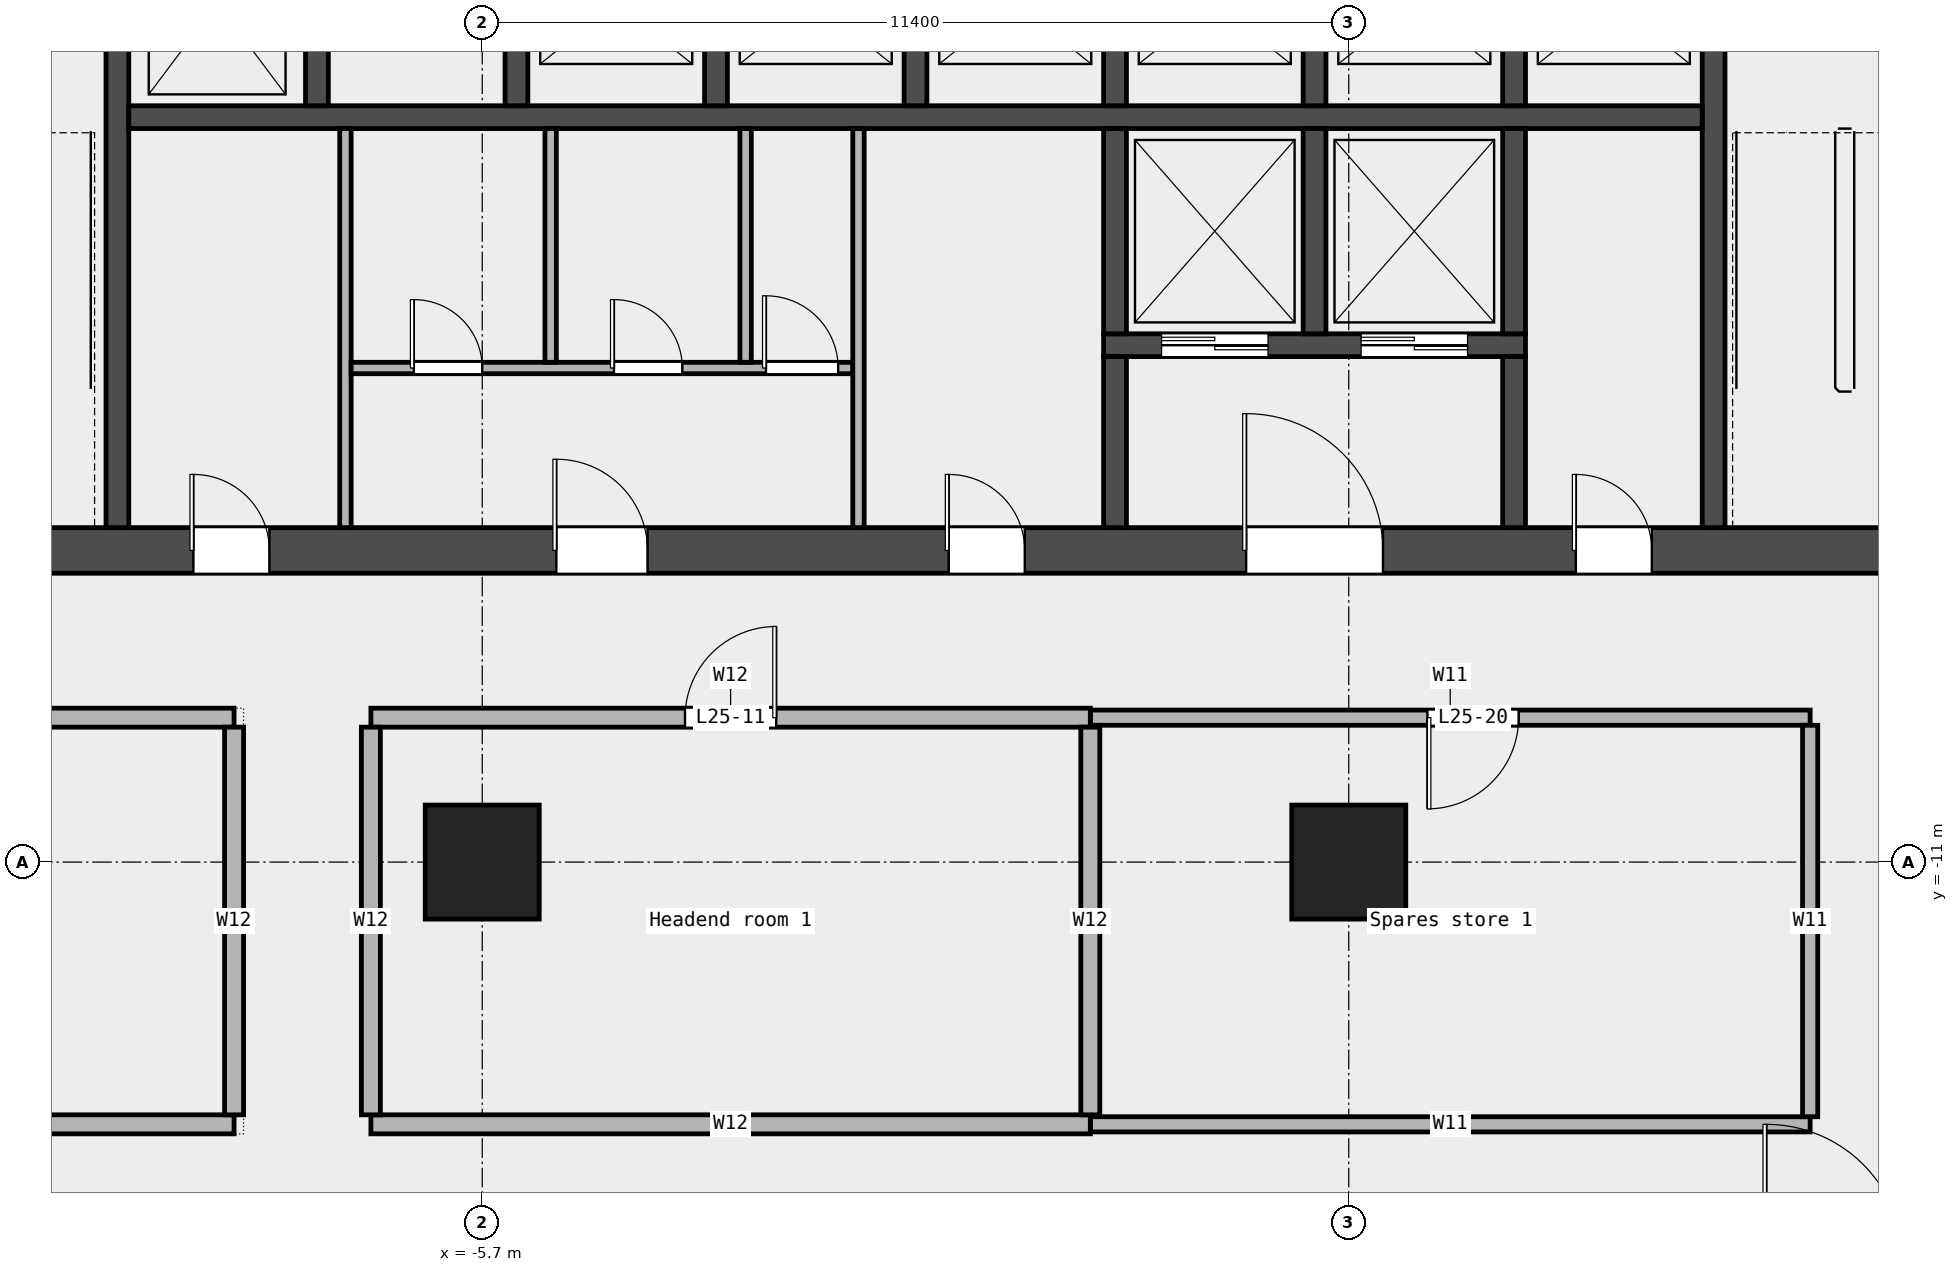
"""IFC4 building model, lengths in metres.
Left out: names, types, materials, properties, quantities, classifications, styles, units other than length and angle.
Written with IfcOpenShell. Run it as: python <this file> out.ifc"""

import sys

from ifc_helpers import new_model, si_unit, direction, frame, frame_2d, origin, origin_2d, place, context, subcontext, project, spatial, rectangle, extrude, element, fill, save


model = new_model("IFC4")
c1 = context("Model", 3, precision=1e-05, world=origin(), true_north=direction((0.0, 1.0)))
c2 = subcontext(c1, "Body", "Model", "MODEL_VIEW")
j1 = project(units=[si_unit("LENGTHUNIT", "METRE"), si_unit("PLANEANGLEUNIT", "RADIAN")], contexts=[c1])
p1 = place(None, origin())
s1 = spatial("IfcSite", under=j1, at=p1, CompositionType="ELEMENT")
p2 = place(p1, origin())
s2 = spatial("IfcBuilding", under=s1, at=p2, CompositionType="ELEMENT")
p3 = place(p2, frame((0.0, 0.0, 126.1)))
s3 = spatial("IfcBuildingStorey", under=s2, at=p3, CompositionType="ELEMENT", Elevation=126.1)
for number, where, z_axis, x_axis in (
    (1, (-5.7, -11.0, 0.0), (0.0, 0.0, 1.0), (1.0, 0.0, 0.0)),
    (2, (5.7, -11.0, 0.0), (0.0, 0.0, 1.0), (1.0, 0.0, 0.0)),
):
    element("IfcColumn", number, at=place(p3, frame(where, z_axis=z_axis, x_axis=x_axis)), inside=s3, PredefinedType="COLUMN", context=c2, shape_type="SweptSolid", body=[
        extrude(rectangle(XDim=1.5, YDim=1.5, at=origin_2d()), origin(), (0.0, 0.0, 1.0), 4.05),
    ])
p4 = place(p3, frame((2.3, -14.45, 0.0), z_axis=(0.0, 0.0, 1.0), x_axis=(1.0, 0.0, 0.0)))
e3 = element("IfcWall", 3, at=p4, inside=s3, PredefinedType="PARTITIONING", context=c2, shape_type="SweptSolid", body=[
    extrude(rectangle(XDim=9.47, YDim=0.2, at=frame_2d((4.735, 0.0))), origin(), (0.0, 0.0, 1.0), 4.05),
])
p5 = place(p3, frame((-15.9, -14.45, 0.0), z_axis=(0.0, 0.0, 1.0), x_axis=(1.0, 0.0, 0.0)))
e4 = element("IfcWall", 4, at=p5, inside=s3, PredefinedType="PARTITIONING", context=c2, shape_type="SweptSolid", body=[
    extrude(rectangle(XDim=6.935, YDim=0.25, at=frame_2d((3.467, 0.0))), origin(), (0.0, 0.0, 1.0), 4.05),
])
p6 = place(p3, frame((-7.165, -14.45, 0.0), z_axis=(0.0, 0.0, 1.0), x_axis=(1.0, 0.0, 0.0)))
e5 = element("IfcWall", 5, at=p6, inside=s3, PredefinedType="PARTITIONING", context=c2, shape_type="SweptSolid", body=[
    extrude(rectangle(XDim=9.465, YDim=0.25, at=frame_2d((4.732, 0.0))), origin(), (0.0, 0.0, 1.0), 4.05),
])
p7 = place(p3, frame((2.3, -9.1, 0.0), z_axis=(0.0, 0.0, 1.0), x_axis=(1.0, 0.0, 0.0)))
e6 = element("IfcWall", 6, at=p7, inside=s3, PredefinedType="PARTITIONING", context=c2, shape_type="SweptSolid", body=[
    extrude(rectangle(XDim=9.47, YDim=0.2, at=frame_2d((4.735, 0.0))), origin(), (0.0, 0.0, 1.0), 4.05),
])
p8 = place(p7, frame((4.435, 0.0, 0.0)))
e7 = element("IfcOpeningElement", 7, at=p8, cuts=e6, PredefinedType="OPENING", context=c2, shape_type="SweptSolid", body=[
    extrude(rectangle(XDim=1.2, YDim=2.1, at=frame_2d((0.6, 1.05))), frame((0.0, 0.112, 0.0), z_axis=(0.0, -1.0, 0.0), x_axis=(1.0, 0.0, 0.0)), (0.0, 0.0, 1.0), 0.224),
])
p9 = place(p3, frame((-15.9, -9.1, 0.0), z_axis=(0.0, 0.0, 1.0), x_axis=(1.0, 0.0, 0.0)))
e8 = element("IfcWall", 8, at=p9, inside=s3, PredefinedType="PARTITIONING", context=c2, shape_type="SweptSolid", body=[
    extrude(rectangle(XDim=6.935, YDim=0.25, at=frame_2d((3.467, 0.0))), origin(), (0.0, 0.0, 1.0), 4.05),
])
p10 = place(p9, frame((3.018, 0.0, 0.0)))
e9 = element("IfcOpeningElement", 9, at=p10, cuts=e8, PredefinedType="OPENING", context=c2, shape_type="SweptSolid", body=[
    extrude(rectangle(XDim=0.9, YDim=2.1, at=frame_2d((0.45, 1.05))), frame((0.0, 0.137, 0.0), z_axis=(0.0, -1.0, 0.0), x_axis=(1.0, 0.0, 0.0)), (0.0, 0.0, 1.0), 0.274),
])
p11 = place(p3, frame((-7.165, -9.1, 0.0), z_axis=(0.0, 0.0, 1.0), x_axis=(1.0, 0.0, 0.0)))
e10 = element("IfcWall", 10, at=p11, inside=s3, PredefinedType="PARTITIONING", context=c2, shape_type="SweptSolid", body=[
    extrude(rectangle(XDim=9.465, YDim=0.25, at=frame_2d((4.732, 0.0))), origin(), (0.0, 0.0, 1.0), 4.05),
])
p12 = place(p11, frame((4.133, 0.0, 0.0)))
e11 = element("IfcOpeningElement", 11, at=p12, cuts=e10, PredefinedType="OPENING", context=c2, shape_type="SweptSolid", body=[
    extrude(rectangle(XDim=1.2, YDim=2.1, at=frame_2d((0.6, 1.05))), frame((0.0, 0.137, 0.0), z_axis=(0.0, -1.0, 0.0), x_axis=(1.0, 0.0, 0.0)), (0.0, 0.0, 1.0), 0.274),
])
for number, where, z_axis, x_axis in (
    (12, (-8.965, -14.325, 0.0), (0.0, 0.0, 1.0), (0.0, 1.0, 0.0)),
    (13, (-7.165, -14.325, 0.0), (0.0, 0.0, 1.0), (0.0, 1.0, 0.0)),
    (14, (2.3, -14.325, 0.0), (0.0, 0.0, 1.0), (0.0, 1.0, 0.0)),
):
    element("IfcWall", number, at=place(p3, frame(where, z_axis=z_axis, x_axis=x_axis)), inside=s3, PredefinedType="PARTITIONING", context=c2, shape_type="SweptSolid", body=[
        extrude(rectangle(XDim=5.1, YDim=0.25, at=frame_2d((2.55, 0.0))), origin(), (0.0, 0.0, 1.0), 4.05),
    ])
p13 = place(p3, frame((11.77, -14.35, 0.0), z_axis=(0.0, 0.0, 1.0), x_axis=(0.0, 1.0, 0.0)))
e15 = element("IfcWall", 15, at=p13, inside=s3, PredefinedType="PARTITIONING", context=c2, shape_type="SweptSolid", body=[
    extrude(rectangle(XDim=5.15, YDim=0.2, at=frame_2d((2.575, 0.0))), origin(), (0.0, 0.0, 1.0), 4.05),
])
p14 = place(p3, frame((-14.4, -6.9, 0.0), z_axis=(0.0, 0.0, 1.0), x_axis=(1.0, 0.0, 0.0)))
e16 = element("IfcWall", 16, at=p14, inside=s3, PredefinedType="SHEAR", context=c2, shape_type="SweptSolid", body=[
    extrude(rectangle(XDim=28.8, YDim=0.6, at=frame_2d((14.4, 0.0))), origin(), (0.0, 0.0, 1.0), 4.2),
])
p15 = place(p14, frame((4.9, 0.0, 0.0)))
e17 = element("IfcOpeningElement", 17, at=p15, cuts=e16, PredefinedType="OPENING", context=c2, shape_type="SweptSolid", body=[
    extrude(rectangle(XDim=1.0, YDim=2.1, at=frame_2d((0.5, 1.05))), frame((0.0, 0.312, 0.0), z_axis=(0.0, -1.0, 0.0), x_axis=(1.0, 0.0, 0.0)), (0.0, 0.0, 1.0), 0.624),
])
p16 = place(p14, frame((9.675, 0.0, 0.0)))
e18 = element("IfcOpeningElement", 18, at=p16, cuts=e16, PredefinedType="OPENING", context=c2, shape_type="SweptSolid", body=[
    extrude(rectangle(XDim=1.2, YDim=2.1, at=frame_2d((0.6, 1.05))), frame((0.0, 0.312, 0.0), z_axis=(0.0, -1.0, 0.0), x_axis=(1.0, 0.0, 0.0)), (0.0, 0.0, 1.0), 0.624),
])
p17 = place(p14, frame((14.837, 0.0, 0.0)))
e19 = element("IfcOpeningElement", 19, at=p17, cuts=e16, PredefinedType="OPENING", context=c2, shape_type="SweptSolid", body=[
    extrude(rectangle(XDim=1.0, YDim=2.1, at=frame_2d((0.5, 1.05))), frame((0.0, 0.312, 0.0), z_axis=(0.0, -1.0, 0.0), x_axis=(1.0, 0.0, 0.0)), (0.0, 0.0, 1.0), 0.624),
])
p18 = place(p14, frame((18.75, 0.0, 0.0)))
e20 = element("IfcOpeningElement", 20, at=p18, cuts=e16, PredefinedType="OPENING", context=c2, shape_type="SweptSolid", body=[
    extrude(rectangle(XDim=1.8, YDim=2.1, at=frame_2d((0.9, 1.05))), frame((0.0, 0.312, 0.0), z_axis=(0.0, -1.0, 0.0), x_axis=(1.0, 0.0, 0.0)), (0.0, 0.0, 1.0), 0.624),
])
p19 = place(p14, frame((23.087, 0.0, 0.0)))
e21 = element("IfcOpeningElement", 21, at=p19, cuts=e16, PredefinedType="OPENING", context=c2, shape_type="SweptSolid", body=[
    extrude(rectangle(XDim=1.0, YDim=2.1, at=frame_2d((0.5, 1.05))), frame((0.0, 0.312, 0.0), z_axis=(0.0, -1.0, 0.0), x_axis=(1.0, 0.0, 0.0)), (0.0, 0.0, 1.0), 0.624),
])
for number, where, z_axis, x_axis in (
    (22, (-10.5, -6.6, 0.0), (0.0, 0.0, 1.0), (0.0, 1.0, 0.0)),
    (23, (10.5, -6.6, 0.0), (0.0, 0.0, 1.0), (0.0, 1.0, 0.0)),
):
    element("IfcWall", number, at=place(p3, frame(where, z_axis=z_axis, x_axis=x_axis)), inside=s3, PredefinedType="SHEAR", context=c2, shape_type="SweptSolid", body=[
        extrude(rectangle(XDim=8.55, YDim=0.3, at=frame_2d((4.275, 0.0))), origin(), (0.0, 0.0, 1.0), 4.2),
    ])
p20 = place(p3, frame((-10.35, -1.2, 0.0), z_axis=(0.0, 0.0, 1.0), x_axis=(1.0, 0.0, 0.0)))
e24 = element("IfcWall", 24, at=p20, inside=s3, PredefinedType="SOLIDWALL", context=c2, shape_type="SweptSolid", body=[
    extrude(rectangle(XDim=20.7, YDim=0.3, at=frame_2d((10.35, 0.0))), origin(), (0.0, 0.0, 1.0), 4.2),
])
for number, where, z_axis, x_axis in (
    (25, (-7.875, -1.05, 0.0), (0.0, 0.0, 1.0), (0.0, 1.0, 0.0)),
    (26, (-5.25, -1.05, 0.0), (0.0, 0.0, 1.0), (0.0, 1.0, 0.0)),
    (27, (-2.625, -1.05, 0.0), (0.0, 0.0, 1.0), (0.0, 1.0, 0.0)),
    (28, (0.0, -1.05, 0.0), (0.0, 0.0, 1.0), (0.0, 1.0, 0.0)),
    (29, (2.625, -1.05, 0.0), (0.0, 0.0, 1.0), (0.0, 1.0, 0.0)),
    (30, (5.25, -1.05, 0.0), (0.0, 0.0, 1.0), (0.0, 1.0, 0.0)),
    (31, (7.875, -1.05, 0.0), (0.0, 0.0, 1.0), (0.0, 1.0, 0.0)),
):
    element("IfcWall", number, at=place(p3, frame(where, z_axis=z_axis, x_axis=x_axis)), inside=s3, PredefinedType="SOLIDWALL", context=c2, shape_type="SweptSolid", body=[
        extrude(rectangle(XDim=2.7, YDim=0.3, at=frame_2d((1.35, 0.0))), origin(), (0.0, 0.0, 1.0), 4.2),
    ])
p21 = place(p3, frame((2.475, -4.2, 0.0), z_axis=(0.0, 0.0, 1.0), x_axis=(1.0, 0.0, 0.0)))
e32 = element("IfcWall", 32, at=p21, inside=s3, PredefinedType="SOLIDWALL", context=c2, shape_type="SweptSolid", body=[
    extrude(rectangle(XDim=5.55, YDim=0.3, at=frame_2d((2.775, 0.0))), origin(), (0.0, 0.0, 1.0), 4.2),
])
p22 = place(p21, frame((0.762, 0.0, 0.0)))
e33 = element("IfcOpeningElement", 33, at=p22, cuts=e32, PredefinedType="OPENING", context=c2, shape_type="SweptSolid", body=[
    extrude(rectangle(XDim=1.4, YDim=2.1, at=frame_2d((0.7, 1.05))), frame((0.0, 0.162, 0.0), z_axis=(0.0, -1.0, 0.0), x_axis=(1.0, 0.0, 0.0)), (0.0, 0.0, 1.0), 0.324),
])
p23 = place(p21, frame((3.387, 0.0, 0.0)))
e34 = element("IfcOpeningElement", 34, at=p23, cuts=e32, PredefinedType="OPENING", context=c2, shape_type="SweptSolid", body=[
    extrude(rectangle(XDim=1.4, YDim=2.1, at=frame_2d((0.7, 1.05))), frame((0.0, 0.162, 0.0), z_axis=(0.0, -1.0, 0.0), x_axis=(1.0, 0.0, 0.0)), (0.0, 0.0, 1.0), 0.324),
])
p24 = place(p3, frame((2.625, -4.05, 0.0), z_axis=(0.0, 0.0, 1.0), x_axis=(0.0, 1.0, 0.0)))
e35 = element("IfcWall", 35, at=p24, inside=s3, PredefinedType="SOLIDWALL", context=c2, shape_type="SweptSolid", body=[
    extrude(rectangle(XDim=2.7, YDim=0.3, at=frame_2d((1.35, 0.0))), origin(), (0.0, 0.0, 1.0), 4.2),
])
p25 = place(p3, frame((2.625, -6.6, 0.0), z_axis=(0.0, 0.0, 1.0), x_axis=(0.0, 1.0, 0.0)))
e36 = element("IfcWall", 36, at=p25, inside=s3, PredefinedType="SOLIDWALL", context=c2, shape_type="SweptSolid", body=[
    extrude(rectangle(XDim=2.25, YDim=0.3, at=frame_2d((1.125, 0.0))), origin(), (0.0, 0.0, 1.0), 4.2),
])
for number, where, z_axis, x_axis in (
    (37, (5.25, -4.05, 0.0), (0.0, 0.0, 1.0), (0.0, 1.0, 0.0)),
    (38, (7.875, -4.05, 0.0), (0.0, 0.0, 1.0), (0.0, 1.0, 0.0)),
):
    element("IfcWall", number, at=place(p3, frame(where, z_axis=z_axis, x_axis=x_axis)), inside=s3, PredefinedType="SOLIDWALL", context=c2, shape_type="SweptSolid", body=[
        extrude(rectangle(XDim=2.7, YDim=0.3, at=frame_2d((1.35, 0.0))), origin(), (0.0, 0.0, 1.0), 4.2),
    ])
p26 = place(p3, frame((7.875, -6.6, 0.0), z_axis=(0.0, 0.0, 1.0), x_axis=(0.0, 1.0, 0.0)))
e39 = element("IfcWall", 39, at=p26, inside=s3, PredefinedType="SOLIDWALL", context=c2, shape_type="SweptSolid", body=[
    extrude(rectangle(XDim=2.25, YDim=0.3, at=frame_2d((1.125, 0.0))), origin(), (0.0, 0.0, 1.0), 4.2),
])
p27 = place(p3, frame((-7.5, -6.6, 0.0), z_axis=(0.0, 0.0, 1.0), x_axis=(0.0, 1.0, 0.0)))
e40 = element("IfcWall", 40, at=p27, inside=s3, PredefinedType="PARTITIONING", context=c2, shape_type="SweptSolid", body=[
    extrude(rectangle(XDim=5.25, YDim=0.15, at=frame_2d((2.625, 0.0))), origin(), (0.0, 0.0, 1.0), 4.2),
])
p28 = place(p3, frame((-7.425, -4.5, 0.0), z_axis=(0.0, 0.0, 1.0), x_axis=(1.0, 0.0, 0.0)))
e41 = element("IfcWall", 41, at=p28, inside=s3, PredefinedType="PARTITIONING", context=c2, shape_type="SweptSolid", body=[
    extrude(rectangle(XDim=6.6, YDim=0.15, at=frame_2d((3.3, 0.0))), origin(), (0.0, 0.0, 1.0), 4.2),
])
p29 = place(p28, frame((0.825, 0.0, 0.0)))
e42 = element("IfcOpeningElement", 42, at=p29, cuts=e41, PredefinedType="OPENING", context=c2, shape_type="SweptSolid", body=[
    extrude(rectangle(XDim=0.9, YDim=2.1, at=frame_2d((0.45, 1.05))), frame((0.0, 0.087, 0.0), z_axis=(0.0, -1.0, 0.0), x_axis=(1.0, 0.0, 0.0)), (0.0, 0.0, 1.0), 0.174),
])
p30 = place(p28, frame((3.458, 0.0, 0.0)))
e43 = element("IfcOpeningElement", 43, at=p30, cuts=e41, PredefinedType="OPENING", context=c2, shape_type="SweptSolid", body=[
    extrude(rectangle(XDim=0.9, YDim=2.1, at=frame_2d((0.45, 1.05))), frame((0.0, 0.087, 0.0), z_axis=(0.0, -1.0, 0.0), x_axis=(1.0, 0.0, 0.0)), (0.0, 0.0, 1.0), 0.174),
])
p31 = place(p28, frame((5.458, 0.0, 0.0)))
e44 = element("IfcOpeningElement", 44, at=p31, cuts=e41, PredefinedType="OPENING", context=c2, shape_type="SweptSolid", body=[
    extrude(rectangle(XDim=0.95, YDim=2.1, at=frame_2d((0.475, 1.05))), frame((0.0, 0.087, 0.0), z_axis=(0.0, -1.0, 0.0), x_axis=(1.0, 0.0, 0.0)), (0.0, 0.0, 1.0), 0.174),
])
for number, where, z_axis, x_axis in (
    (45, (-4.8, -4.425, 0.0), (0.0, 0.0, 1.0), (0.0, 1.0, 0.0)),
    (46, (-2.235, -4.425, 0.0), (0.0, 0.0, 1.0), (0.0, 1.0, 0.0)),
):
    element("IfcWall", number, at=place(p3, frame(where, z_axis=z_axis, x_axis=x_axis)), inside=s3, PredefinedType="PARTITIONING", context=c2, shape_type="SweptSolid", body=[
        extrude(rectangle(XDim=3.075, YDim=0.15, at=frame_2d((1.538, 0.0))), origin(), (0.0, 0.0, 1.0), 4.2),
    ])
p32 = place(p3, frame((-0.75, -6.6, 0.0), z_axis=(0.0, 0.0, 1.0), x_axis=(0.0, 1.0, 0.0)))
e47 = element("IfcWall", 47, at=p32, inside=s3, PredefinedType="PARTITIONING", context=c2, shape_type="SweptSolid", body=[
    extrude(rectangle(XDim=5.25, YDim=0.15, at=frame_2d((2.625, 0.0))), origin(), (0.0, 0.0, 1.0), 4.2),
])
p33 = place(p12, origin())
e48 = element("IfcDoor", 48, at=p33, inside=s3, OperationType="SINGLE_SWING_RIGHT", PredefinedType="DOOR", context=c2, shape_type="SweptSolid", body=[
    extrude(rectangle(XDim=1.2, YDim=2.1, at=frame_2d((0.6, 1.05))), frame((0.0, 0.025, 0.0), z_axis=(0.0, -1.0, 0.0), x_axis=(1.0, 0.0, 0.0)), (0.0, 0.0, 1.0), 0.05),
])
fill(e11, e48)
p34 = place(p8, origin())
e49 = element("IfcDoor", 49, at=p34, inside=s3, OperationType="SINGLE_SWING_RIGHT", PredefinedType="DOOR", context=c2, shape_type="SweptSolid", body=[
    extrude(rectangle(XDim=1.2, YDim=2.1, at=frame_2d((0.6, 1.05))), frame((0.0, 0.025, 0.0), z_axis=(0.0, -1.0, 0.0), x_axis=(1.0, 0.0, 0.0)), (0.0, 0.0, 1.0), 0.05),
])
fill(e7, e49)
p35 = place(p22, origin())
e50 = element("IfcDoor", 50, at=p35, inside=s3, OperationType="DOUBLE_DOOR_SLIDING", PredefinedType="DOOR", context=c2, shape_type="SweptSolid", body=[
    extrude(rectangle(XDim=1.4, YDim=2.1, at=frame_2d((0.7, 1.05))), frame((0.0, 0.025, 0.0), z_axis=(0.0, -1.0, 0.0), x_axis=(1.0, 0.0, 0.0)), (0.0, 0.0, 1.0), 0.05),
])
fill(e33, e50)
p36 = place(p23, origin())
e51 = element("IfcDoor", 51, at=p36, inside=s3, OperationType="DOUBLE_DOOR_SLIDING", PredefinedType="DOOR", context=c2, shape_type="SweptSolid", body=[
    extrude(rectangle(XDim=1.4, YDim=2.1, at=frame_2d((0.7, 1.05))), frame((0.0, 0.025, 0.0), z_axis=(0.0, -1.0, 0.0), x_axis=(1.0, 0.0, 0.0)), (0.0, 0.0, 1.0), 0.05),
])
fill(e34, e51)
p37 = place(p15, origin())
e52 = element("IfcDoor", 52, at=p37, inside=s3, OperationType="SINGLE_SWING_LEFT", PredefinedType="DOOR", context=c2, shape_type="SweptSolid", body=[
    extrude(rectangle(XDim=1.0, YDim=2.1, at=frame_2d((0.5, 1.05))), frame((0.0, 0.025, 0.0), z_axis=(0.0, -1.0, 0.0), x_axis=(1.0, 0.0, 0.0)), (0.0, 0.0, 1.0), 0.05),
])
fill(e17, e52)
p38 = place(p16, origin())
e53 = element("IfcDoor", 53, at=p38, inside=s3, OperationType="SINGLE_SWING_LEFT", PredefinedType="DOOR", context=c2, shape_type="SweptSolid", body=[
    extrude(rectangle(XDim=1.2, YDim=2.1, at=frame_2d((0.6, 1.05))), frame((0.0, 0.025, 0.0), z_axis=(0.0, -1.0, 0.0), x_axis=(1.0, 0.0, 0.0)), (0.0, 0.0, 1.0), 0.05),
])
fill(e18, e53)
p39 = place(p29, origin())
e54 = element("IfcDoor", 54, at=p39, inside=s3, OperationType="SINGLE_SWING_LEFT", PredefinedType="DOOR", context=c2, shape_type="SweptSolid", body=[
    extrude(rectangle(XDim=0.9, YDim=2.1, at=frame_2d((0.45, 1.05))), frame((0.0, 0.025, 0.0), z_axis=(0.0, -1.0, 0.0), x_axis=(1.0, 0.0, 0.0)), (0.0, 0.0, 1.0), 0.05),
])
fill(e42, e54)
p40 = place(p30, origin())
e55 = element("IfcDoor", 55, at=p40, inside=s3, OperationType="SINGLE_SWING_LEFT", PredefinedType="DOOR", context=c2, shape_type="SweptSolid", body=[
    extrude(rectangle(XDim=0.9, YDim=2.1, at=frame_2d((0.45, 1.05))), frame((0.0, 0.025, 0.0), z_axis=(0.0, -1.0, 0.0), x_axis=(1.0, 0.0, 0.0)), (0.0, 0.0, 1.0), 0.05),
])
fill(e43, e55)
p41 = place(p31, origin())
e56 = element("IfcDoor", 56, at=p41, inside=s3, OperationType="SINGLE_SWING_LEFT", PredefinedType="DOOR", context=c2, shape_type="SweptSolid", body=[
    extrude(rectangle(XDim=0.95, YDim=2.1, at=frame_2d((0.475, 1.05))), frame((0.0, 0.025, 0.0), z_axis=(0.0, -1.0, 0.0), x_axis=(1.0, 0.0, 0.0)), (0.0, 0.0, 1.0), 0.05),
])
fill(e44, e56)
p42 = place(p17, origin())
e57 = element("IfcDoor", 57, at=p42, inside=s3, OperationType="SINGLE_SWING_LEFT", PredefinedType="DOOR", context=c2, shape_type="SweptSolid", body=[
    extrude(rectangle(XDim=1.0, YDim=2.1, at=frame_2d((0.5, 1.05))), frame((0.0, 0.025, 0.0), z_axis=(0.0, -1.0, 0.0), x_axis=(1.0, 0.0, 0.0)), (0.0, 0.0, 1.0), 0.05),
])
fill(e19, e57)
p43 = place(p18, origin())
e58 = element("IfcDoor", 58, at=p43, inside=s3, OperationType="DOUBLE_DOOR_SINGLE_SWING", PredefinedType="DOOR", context=c2, shape_type="SweptSolid", body=[
    extrude(rectangle(XDim=1.8, YDim=2.1, at=frame_2d((0.9, 1.05))), frame((0.0, 0.025, 0.0), z_axis=(0.0, -1.0, 0.0), x_axis=(1.0, 0.0, 0.0)), (0.0, 0.0, 1.0), 0.05),
])
fill(e20, e58)
p44 = place(p19, origin())
e59 = element("IfcDoor", 59, at=p44, inside=s3, OperationType="SINGLE_SWING_LEFT", PredefinedType="DOOR", context=c2, shape_type="SweptSolid", body=[
    extrude(rectangle(XDim=1.0, YDim=2.1, at=frame_2d((0.5, 1.05))), frame((0.0, 0.025, 0.0), z_axis=(0.0, -1.0, 0.0), x_axis=(1.0, 0.0, 0.0)), (0.0, 0.0, 1.0), 0.05),
])
fill(e21, e59)
save(model, sys.argv[1])
